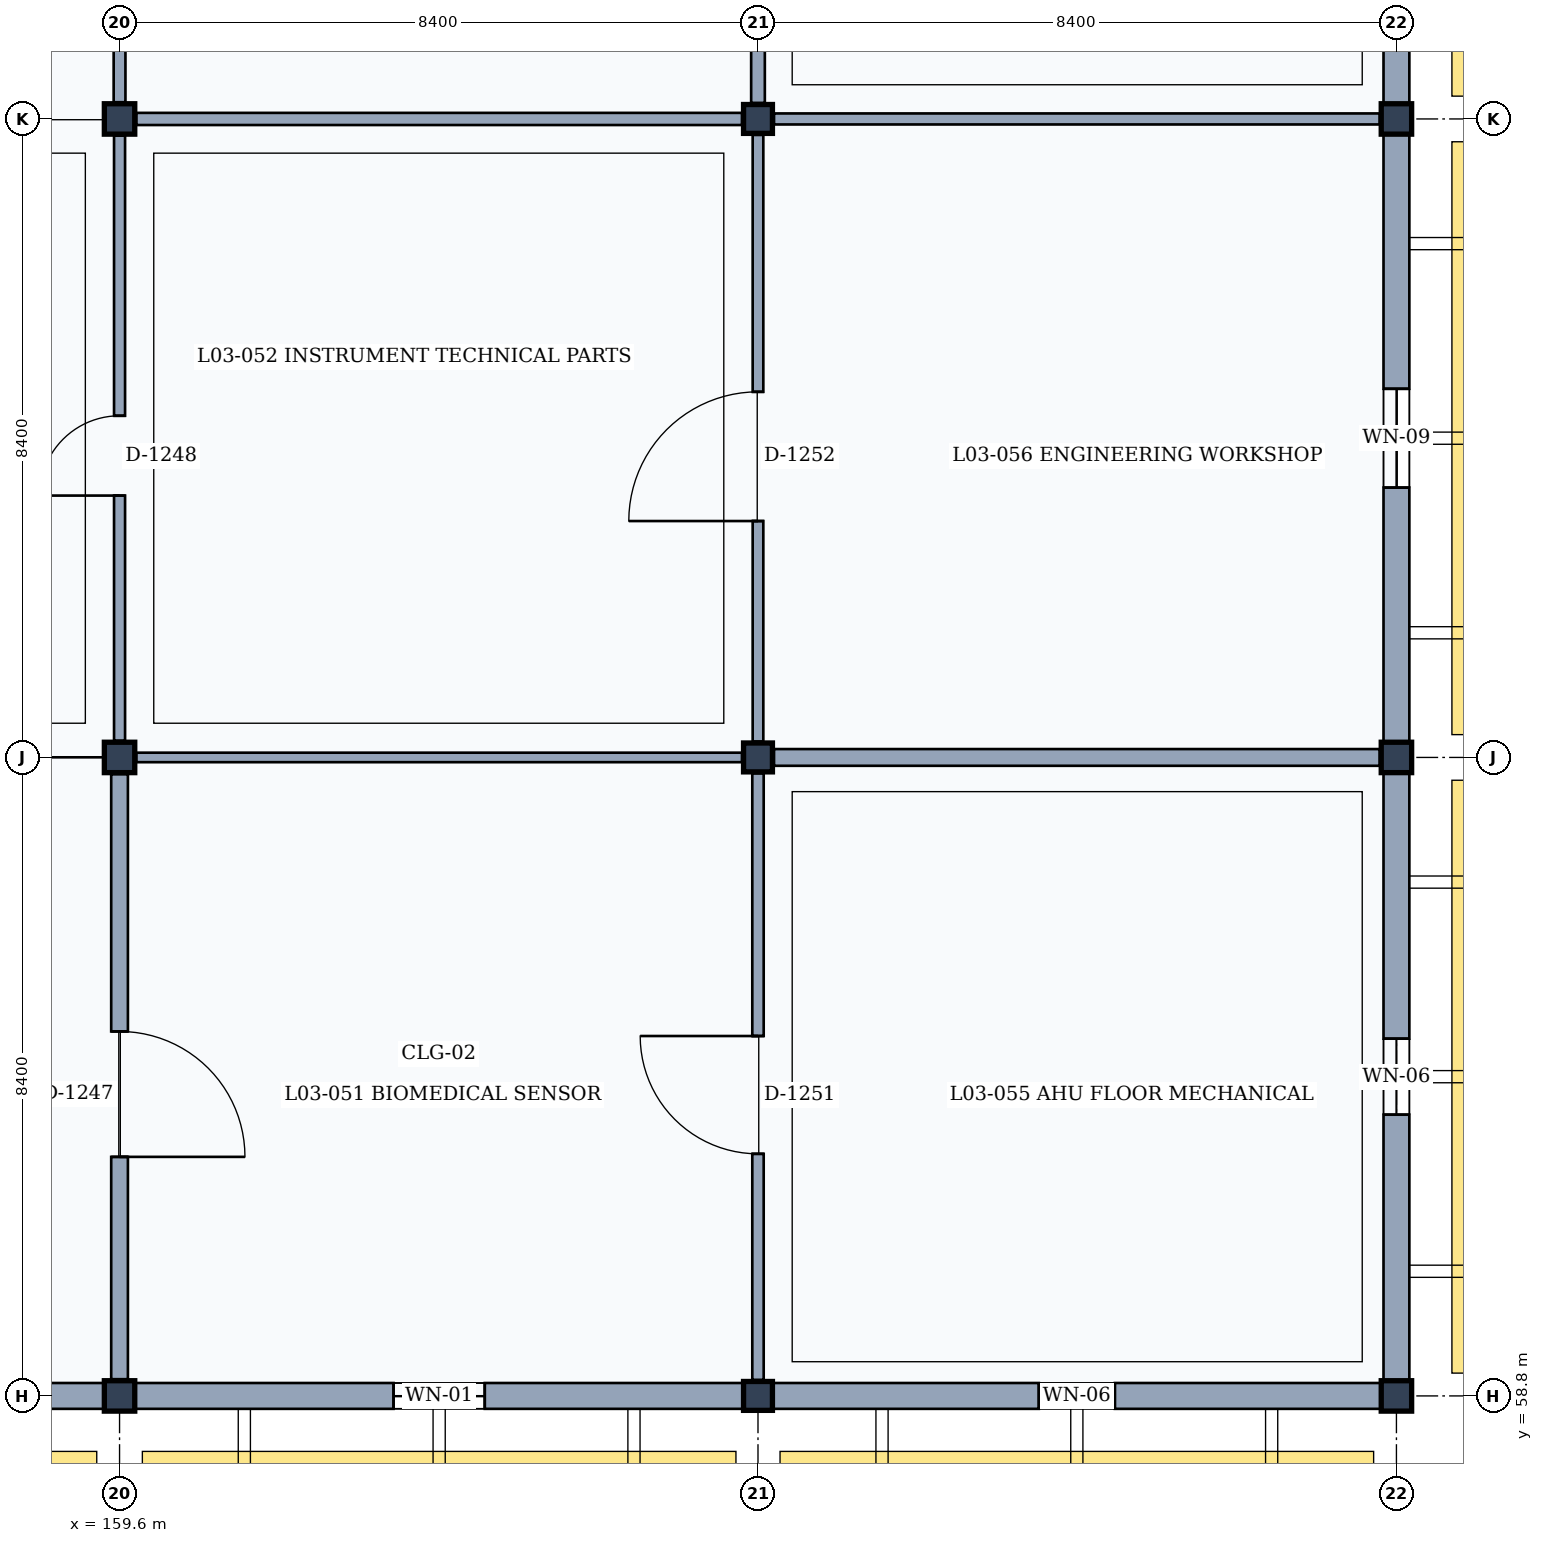
"""IFC4 building model, lengths in metres.
Left out: names, types, materials, properties, quantities, classifications, styles, units other than length and angle.
Written with IfcOpenShell. Run it as: python <this file> out.ifc"""

import sys

from ifc_helpers import new_model, si_unit, direction, frame, frame_2d, origin, origin_2d, place, context, subcontext, project, spatial, rectangle, extrude, element, fill, save


model = new_model("IFC4")
c1 = context("Model", 3, precision=1e-05, world=origin(), true_north=direction((0.0, 1.0)))
c2 = subcontext(c1, "Body", "Model", "MODEL_VIEW")
j1 = project(units=[si_unit("LENGTHUNIT", "METRE"), si_unit("PLANEANGLEUNIT", "RADIAN")], contexts=[c1])
p1 = place(None, origin())
s1 = spatial("IfcSite", under=j1, at=p1, CompositionType="ELEMENT")
p2 = place(p1, origin())
s2 = spatial("IfcBuilding", under=s1, at=p2, CompositionType="ELEMENT")
p3 = place(p2, frame((0.0, 0.0, 13.8)))
s3 = spatial("IfcBuildingStorey", under=s2, at=p3, CompositionType="ELEMENT", Elevation=13.8)
for number, where, z_axis, x_axis in (
    (1, (159.6, 58.8, 0.0), (0.0, 0.0, 1.0), (1.0, 0.0, 0.0)),
    (2, (159.6, 67.2, 0.0), (0.0, 0.0, 1.0), (1.0, 0.0, 0.0)),
    (3, (159.6, 75.6, 0.0), (0.0, 0.0, 1.0), (1.0, 0.0, 0.0)),
):
    element("IfcColumn", number, at=place(p3, frame(where, z_axis=z_axis, x_axis=x_axis)), inside=s3, PredefinedType="COLUMN", context=c2, shape_type="SweptSolid", body=[
        extrude(rectangle(XDim=0.4, YDim=0.4, at=origin_2d()), origin(), (0.0, 0.0, 1.0), 4.2),
    ])
for number, where, z_axis, x_axis in (
    (4, (168.0, 58.8, 0.0), (0.0, 0.0, 1.0), (1.0, 0.0, 0.0)),
    (5, (168.0, 67.2, 0.0), (0.0, 0.0, 1.0), (1.0, 0.0, 0.0)),
    (6, (168.0, 75.6, 0.0), (0.0, 0.0, 1.0), (1.0, 0.0, 0.0)),
):
    element("IfcColumn", number, at=place(p3, frame(where, z_axis=z_axis, x_axis=x_axis)), inside=s3, PredefinedType="COLUMN", context=c2, shape_type="SweptSolid", body=[
        extrude(rectangle(XDim=0.38, YDim=0.38, at=origin_2d()), origin(), (0.0, 0.0, 1.0), 4.2),
    ])
for number, where, z_axis, x_axis in (
    (7, (176.4, 58.8, 0.0), (0.0, 0.0, 1.0), (1.0, 0.0, 0.0)),
    (8, (176.4, 67.2, 0.0), (0.0, 0.0, 1.0), (1.0, 0.0, 0.0)),
    (9, (176.4, 75.6, 0.0), (0.0, 0.0, 1.0), (1.0, 0.0, 0.0)),
):
    element("IfcColumn", number, at=place(p3, frame(where, z_axis=z_axis, x_axis=x_axis)), inside=s3, PredefinedType="COLUMN", context=c2, shape_type="SweptSolid", body=[
        extrude(rectangle(XDim=0.4, YDim=0.4, at=origin_2d()), origin(), (0.0, 0.0, 1.0), 4.2),
    ])
p4 = place(p3, frame((159.4, 58.8, 0.0), z_axis=(0.0, 0.0, 1.0), x_axis=(-1.0, 0.0, 0.0)))
e10 = element("IfcWall", 10, at=p4, inside=s3, PredefinedType="SOLIDWALL", context=c2, shape_type="SweptSolid", body=[
    extrude(rectangle(XDim=8.01, YDim=0.34, at=frame_2d((4.005, 0.0))), origin(), (0.0, 0.0, 1.0), 3.36),
])
p5 = place(p4, frame((3.03, 0.0, 0.9)))
e11 = element("IfcOpeningElement", 11, at=p5, cuts=e10, PredefinedType="OPENING", context=c2, shape_type="SweptSolid", body=[
    extrude(rectangle(XDim=1.95, YDim=1.7, at=frame_2d((0.975, 0.85))), frame((0.0, 0.18, 0.0), z_axis=(0.0, -1.0, 0.0), x_axis=(1.0, 0.0, 0.0)), (0.0, 0.0, 1.0), 0.36),
])
p6 = place(p3, frame((167.81, 58.8, 0.0), z_axis=(0.0, 0.0, 1.0), x_axis=(-1.0, 0.0, 0.0)))
e12 = element("IfcWall", 12, at=p6, inside=s3, PredefinedType="SOLIDWALL", context=c2, shape_type="SweptSolid", body=[
    extrude(rectangle(XDim=8.01, YDim=0.34, at=frame_2d((4.005, 0.0))), origin(), (0.0, 0.0, 1.0), 3.36),
])
p7 = place(p6, frame((3.405, 0.0, 0.9)))
e13 = element("IfcOpeningElement", 13, at=p7, cuts=e12, PredefinedType="OPENING", context=c2, shape_type="SweptSolid", body=[
    extrude(rectangle(XDim=1.2, YDim=1.8, at=frame_2d((0.6, 0.9))), frame((0.0, 0.18, 0.0), z_axis=(0.0, -1.0, 0.0), x_axis=(1.0, 0.0, 0.0)), (0.0, 0.0, 1.0), 0.36),
])
p8 = place(p3, frame((176.2, 58.8, 0.0), z_axis=(0.0, 0.0, 1.0), x_axis=(-1.0, 0.0, 0.0)))
e14 = element("IfcWall", 14, at=p8, inside=s3, PredefinedType="SOLIDWALL", context=c2, shape_type="SweptSolid", body=[
    extrude(rectangle(XDim=8.01, YDim=0.34, at=frame_2d((4.005, 0.0))), origin(), (0.0, 0.0, 1.0), 3.36),
])
p9 = place(p8, frame((3.505, 0.0, 0.9)))
e15 = element("IfcOpeningElement", 15, at=p9, cuts=e14, PredefinedType="OPENING", context=c2, shape_type="SweptSolid", body=[
    extrude(rectangle(XDim=1.0, YDim=1.4, at=frame_2d((0.5, 0.7))), frame((0.0, 0.18, 0.0), z_axis=(0.0, -1.0, 0.0), x_axis=(1.0, 0.0, 0.0)), (0.0, 0.0, 1.0), 0.36),
])
p10 = place(p3, frame((176.4, 67.0, 0.0), z_axis=(0.0, 0.0, 1.0), x_axis=(0.0, -1.0, 0.0)))
e16 = element("IfcWall", 16, at=p10, inside=s3, PredefinedType="SOLIDWALL", context=c2, shape_type="SweptSolid", body=[
    extrude(rectangle(XDim=8.0, YDim=0.34, at=frame_2d((4.0, 0.0))), origin(), (0.0, 0.0, 1.0), 3.36),
])
p11 = place(p10, frame((3.5, 0.0, 0.9)))
e17 = element("IfcOpeningElement", 17, at=p11, cuts=e16, PredefinedType="OPENING", context=c2, shape_type="SweptSolid", body=[
    extrude(rectangle(XDim=1.0, YDim=1.4, at=frame_2d((0.5, 0.7))), frame((0.0, 0.18, 0.0), z_axis=(0.0, -1.0, 0.0), x_axis=(1.0, 0.0, 0.0)), (0.0, 0.0, 1.0), 0.36),
])
p12 = place(p3, frame((176.4, 75.4, 0.0), z_axis=(0.0, 0.0, 1.0), x_axis=(0.0, -1.0, 0.0)))
e18 = element("IfcWall", 18, at=p12, inside=s3, PredefinedType="SOLIDWALL", context=c2, shape_type="SweptSolid", body=[
    extrude(rectangle(XDim=8.0, YDim=0.34, at=frame_2d((4.0, 0.0))), origin(), (0.0, 0.0, 1.0), 3.36),
])
p13 = place(p12, frame((3.35, 0.0, 0.9)))
e19 = element("IfcOpeningElement", 19, at=p13, cuts=e18, PredefinedType="OPENING", context=c2, shape_type="SweptSolid", body=[
    extrude(rectangle(XDim=1.3, YDim=1.75, at=frame_2d((0.65, 0.875))), frame((0.0, 0.18, 0.0), z_axis=(0.0, -1.0, 0.0), x_axis=(1.0, 0.0, 0.0)), (0.0, 0.0, 1.0), 0.36),
])
p14 = place(p3, frame((176.4, 83.8, 0.0), z_axis=(0.0, 0.0, 1.0), x_axis=(0.0, -1.0, 0.0)))
e20 = element("IfcWall", 20, at=p14, inside=s3, PredefinedType="SOLIDWALL", context=c2, shape_type="SweptSolid", body=[
    extrude(rectangle(XDim=8.0, YDim=0.34, at=frame_2d((4.0, 0.0))), origin(), (0.0, 0.0, 1.0), 3.36),
])
p15 = place(p14, frame((2.9, 0.0, 0.9)))
e21 = element("IfcOpeningElement", 21, at=p15, cuts=e20, PredefinedType="OPENING", context=c2, shape_type="SweptSolid", body=[
    extrude(rectangle(XDim=2.2, YDim=1.9, at=frame_2d((1.1, 0.95))), frame((0.0, 0.18, 0.0), z_axis=(0.0, -1.0, 0.0), x_axis=(1.0, 0.0, 0.0)), (0.0, 0.0, 1.0), 0.36),
])
p16 = place(p3, frame((159.6, 59.02, 0.0), z_axis=(0.0, 0.0, 1.0), x_axis=(0.0, 1.0, 0.0)))
e22 = element("IfcWall", 22, at=p16, inside=s3, PredefinedType="PARTITIONING", context=c2, shape_type="SweptSolid", body=[
    extrude(rectangle(XDim=7.96, YDim=0.22, at=frame_2d((3.98, 0.0))), origin(), (0.0, 0.0, 1.0), 3.32),
])
p17 = place(p16, frame((2.925, 0.0, 0.0)))
e23 = element("IfcOpeningElement", 23, at=p17, cuts=e22, PredefinedType="OPENING", context=c2, shape_type="SweptSolid", body=[
    extrude(rectangle(XDim=1.65, YDim=2.25, at=frame_2d((0.825, 1.125))), frame((0.0, 0.12, 0.0), z_axis=(0.0, -1.0, 0.0), x_axis=(1.0, 0.0, 0.0)), (0.0, 0.0, 1.0), 0.24),
])
p18 = place(p3, frame((159.6, 67.42, 0.0), z_axis=(0.0, 0.0, 1.0), x_axis=(0.0, 1.0, 0.0)))
e24 = element("IfcWall", 24, at=p18, inside=s3, PredefinedType="PARTITIONING", context=c2, shape_type="SweptSolid", body=[
    extrude(rectangle(XDim=7.96, YDim=0.145, at=frame_2d((3.98, 0.0))), origin(), (0.0, 0.0, 1.0), 3.32),
])
p19 = place(p18, frame((3.225, 0.0, 0.0)))
e25 = element("IfcOpeningElement", 25, at=p19, cuts=e24, PredefinedType="OPENING", context=c2, shape_type="SweptSolid", body=[
    extrude(rectangle(XDim=1.05, YDim=2.2, at=frame_2d((0.525, 1.1))), frame((0.0, 0.083, 0.0), z_axis=(0.0, -1.0, 0.0), x_axis=(1.0, 0.0, 0.0)), (0.0, 0.0, 1.0), 0.165),
])
p20 = place(p3, frame((159.6, 75.82, 0.0), z_axis=(0.0, 0.0, 1.0), x_axis=(0.0, 1.0, 0.0)))
e26 = element("IfcWall", 26, at=p20, inside=s3, PredefinedType="PARTITIONING", context=c2, shape_type="SweptSolid", body=[
    extrude(rectangle(XDim=7.96, YDim=0.155, at=frame_2d((3.98, 0.0))), origin(), (0.0, 0.0, 1.0), 3.32),
])
p21 = place(p20, frame((3.175, 0.0, 0.0)))
e27 = element("IfcOpeningElement", 27, at=p21, cuts=e26, PredefinedType="OPENING", context=c2, shape_type="SweptSolid", body=[
    extrude(rectangle(XDim=1.15, YDim=2.25, at=frame_2d((0.575, 1.125))), frame((0.0, 0.087, 0.0), z_axis=(0.0, -1.0, 0.0), x_axis=(1.0, 0.0, 0.0)), (0.0, 0.0, 1.0), 0.175),
])
p22 = place(p3, frame((168.0, 59.01, 0.0), z_axis=(0.0, 0.0, 1.0), x_axis=(0.0, 1.0, 0.0)))
e28 = element("IfcWall", 28, at=p22, inside=s3, PredefinedType="PARTITIONING", context=c2, shape_type="SweptSolid", body=[
    extrude(rectangle(XDim=7.98, YDim=0.15, at=frame_2d((3.99, 0.0))), origin(), (0.0, 0.0, 1.0), 3.32),
])
p23 = place(p22, frame((2.975, 0.0, 0.0)))
e29 = element("IfcOpeningElement", 29, at=p23, cuts=e28, PredefinedType="OPENING", context=c2, shape_type="SweptSolid", body=[
    extrude(rectangle(XDim=1.55, YDim=2.35, at=frame_2d((0.775, 1.175))), frame((0.0, 0.085, 0.0), z_axis=(0.0, -1.0, 0.0), x_axis=(1.0, 0.0, 0.0)), (0.0, 0.0, 1.0), 0.17),
])
p24 = place(p3, frame((159.82, 67.2, 0.0), z_axis=(0.0, 0.0, 1.0), x_axis=(1.0, 0.0, 0.0)))
e30 = element("IfcWall", 30, at=p24, inside=s3, PredefinedType="PARTITIONING", context=c2, shape_type="SweptSolid", body=[
    extrude(rectangle(XDim=7.97, YDim=0.125, at=frame_2d((3.985, 0.0))), origin(), (0.0, 0.0, 1.0), 3.21),
])
p25 = place(p3, frame((168.0, 67.41, 0.0), z_axis=(0.0, 0.0, 1.0), x_axis=(0.0, 1.0, 0.0)))
e31 = element("IfcWall", 31, at=p25, inside=s3, PredefinedType="PARTITIONING", context=c2, shape_type="SweptSolid", body=[
    extrude(rectangle(XDim=7.98, YDim=0.14, at=frame_2d((3.99, 0.0))), origin(), (0.0, 0.0, 1.0), 3.32),
])
p26 = place(p25, frame((2.9, 0.0, 0.0)))
e32 = element("IfcOpeningElement", 32, at=p26, cuts=e31, PredefinedType="OPENING", context=c2, shape_type="SweptSolid", body=[
    extrude(rectangle(XDim=1.7, YDim=2.3, at=frame_2d((0.85, 1.15))), frame((0.0, 0.08, 0.0), z_axis=(0.0, -1.0, 0.0), x_axis=(1.0, 0.0, 0.0)), (0.0, 0.0, 1.0), 0.16),
])
p27 = place(p3, frame((159.82, 75.6, 0.0), z_axis=(0.0, 0.0, 1.0), x_axis=(1.0, 0.0, 0.0)))
e33 = element("IfcWall", 33, at=p27, inside=s3, PredefinedType="PARTITIONING", context=c2, shape_type="SweptSolid", body=[
    extrude(rectangle(XDim=7.97, YDim=0.16, at=frame_2d((3.985, 0.0))), origin(), (0.0, 0.0, 1.0), 3.22),
])
p28 = place(p3, frame((168.0, 75.81, 0.0), z_axis=(0.0, 0.0, 1.0), x_axis=(0.0, 1.0, 0.0)))
e34 = element("IfcWall", 34, at=p28, inside=s3, PredefinedType="PARTITIONING", context=c2, shape_type="SweptSolid", body=[
    extrude(rectangle(XDim=7.98, YDim=0.18, at=frame_2d((3.99, 0.0))), origin(), (0.0, 0.0, 1.0), 3.32),
])
p29 = place(p28, frame((2.8, 0.0, 0.0)))
e35 = element("IfcOpeningElement", 35, at=p29, cuts=e34, PredefinedType="OPENING", context=c2, shape_type="SweptSolid", body=[
    extrude(rectangle(XDim=1.9, YDim=2.4, at=frame_2d((0.95, 1.2))), frame((0.0, 0.1, 0.0), z_axis=(0.0, -1.0, 0.0), x_axis=(1.0, 0.0, 0.0)), (0.0, 0.0, 1.0), 0.2),
])
p30 = place(p3, frame((168.21, 67.2, 0.0), z_axis=(0.0, 0.0, 1.0), x_axis=(1.0, 0.0, 0.0)))
e36 = element("IfcWall", 36, at=p30, inside=s3, PredefinedType="PARTITIONING", context=c2, shape_type="SweptSolid", body=[
    extrude(rectangle(XDim=7.97, YDim=0.22, at=frame_2d((3.985, 0.0))), origin(), (0.0, 0.0, 1.0), 3.21),
])
p31 = place(p3, frame((168.21, 75.6, 0.0), z_axis=(0.0, 0.0, 1.0), x_axis=(1.0, 0.0, 0.0)))
e37 = element("IfcWall", 37, at=p31, inside=s3, PredefinedType="PARTITIONING", context=c2, shape_type="SweptSolid", body=[
    extrude(rectangle(XDim=7.97, YDim=0.145, at=frame_2d((3.985, 0.0))), origin(), (0.0, 0.0, 1.0), 3.22),
])
p32 = place(p7, origin())
e38 = element("IfcWindow", 38, at=p32, inside=s3, PartitioningType="SINGLE_PANEL", PredefinedType="WINDOW", context=c2, shape_type="SweptSolid", body=[
    extrude(rectangle(XDim=1.2, YDim=1.8, at=frame_2d((0.6, 0.9))), frame((0.0, 0.03, 0.0), z_axis=(0.0, -1.0, 0.0), x_axis=(1.0, 0.0, 0.0)), (0.0, 0.0, 1.0), 0.06),
])
fill(e13, e38)
p33 = place(p9, origin())
e39 = element("IfcWindow", 39, at=p33, inside=s3, PartitioningType="SINGLE_PANEL", PredefinedType="WINDOW", context=c2, shape_type="SweptSolid", body=[
    extrude(rectangle(XDim=1.0, YDim=1.4, at=frame_2d((0.5, 0.7))), frame((0.0, 0.03, 0.0), z_axis=(0.0, -1.0, 0.0), x_axis=(1.0, 0.0, 0.0)), (0.0, 0.0, 1.0), 0.06),
])
fill(e15, e39)
p34 = place(p11, origin())
e40 = element("IfcWindow", 40, at=p34, inside=s3, PartitioningType="SINGLE_PANEL", PredefinedType="WINDOW", context=c2, shape_type="SweptSolid", body=[
    extrude(rectangle(XDim=1.0, YDim=1.4, at=frame_2d((0.5, 0.7))), frame((0.0, 0.03, 0.0), z_axis=(0.0, -1.0, 0.0), x_axis=(1.0, 0.0, 0.0)), (0.0, 0.0, 1.0), 0.06),
])
fill(e17, e40)
p35 = place(p13, origin())
e41 = element("IfcWindow", 41, at=p35, inside=s3, PartitioningType="SINGLE_PANEL", PredefinedType="WINDOW", context=c2, shape_type="SweptSolid", body=[
    extrude(rectangle(XDim=1.3, YDim=1.75, at=frame_2d((0.65, 0.875))), frame((0.0, 0.03, 0.0), z_axis=(0.0, -1.0, 0.0), x_axis=(1.0, 0.0, 0.0)), (0.0, 0.0, 1.0), 0.06),
])
fill(e19, e41)
p36 = place(p17, frame((1.65, 0.0, 0.0), z_axis=(0.0, 0.0, 1.0), x_axis=(-1.0, 0.0, 0.0)))
e42 = element("IfcDoor", 42, at=p36, inside=s3, OperationType="SINGLE_SWING_RIGHT", PredefinedType="DOOR", context=c2, shape_type="SweptSolid", body=[
    extrude(rectangle(XDim=1.65, YDim=2.25, at=frame_2d((0.825, 1.125))), frame((0.0, 0.025, 0.0), z_axis=(0.0, -1.0, 0.0), x_axis=(1.0, 0.0, 0.0)), (0.0, 0.0, 1.0), 0.05),
])
fill(e23, e42)
p37 = place(p19, origin())
e43 = element("IfcDoor", 43, at=p37, inside=s3, OperationType="SINGLE_SWING_LEFT", PredefinedType="DOOR", context=c2, shape_type="SweptSolid", body=[
    extrude(rectangle(XDim=1.05, YDim=2.2, at=frame_2d((0.525, 1.1))), frame((0.0, 0.025, 0.0), z_axis=(0.0, -1.0, 0.0), x_axis=(1.0, 0.0, 0.0)), (0.0, 0.0, 1.0), 0.05),
])
fill(e25, e43)
p38 = place(p23, origin())
e44 = element("IfcDoor", 44, at=p38, inside=s3, OperationType="SINGLE_SWING_RIGHT", PredefinedType="DOOR", context=c2, shape_type="SweptSolid", body=[
    extrude(rectangle(XDim=1.55, YDim=2.35, at=frame_2d((0.775, 1.175))), frame((0.0, 0.025, 0.0), z_axis=(0.0, -1.0, 0.0), x_axis=(1.0, 0.0, 0.0)), (0.0, 0.0, 1.0), 0.05),
])
fill(e29, e44)
p39 = place(p26, origin())
e45 = element("IfcDoor", 45, at=p39, inside=s3, OperationType="SINGLE_SWING_LEFT", PredefinedType="DOOR", context=c2, shape_type="SweptSolid", body=[
    extrude(rectangle(XDim=1.7, YDim=2.3, at=frame_2d((0.85, 1.15))), frame((0.0, 0.025, 0.0), z_axis=(0.0, -1.0, 0.0), x_axis=(1.0, 0.0, 0.0)), (0.0, 0.0, 1.0), 0.05),
])
fill(e32, e45)
save(model, sys.argv[1])
